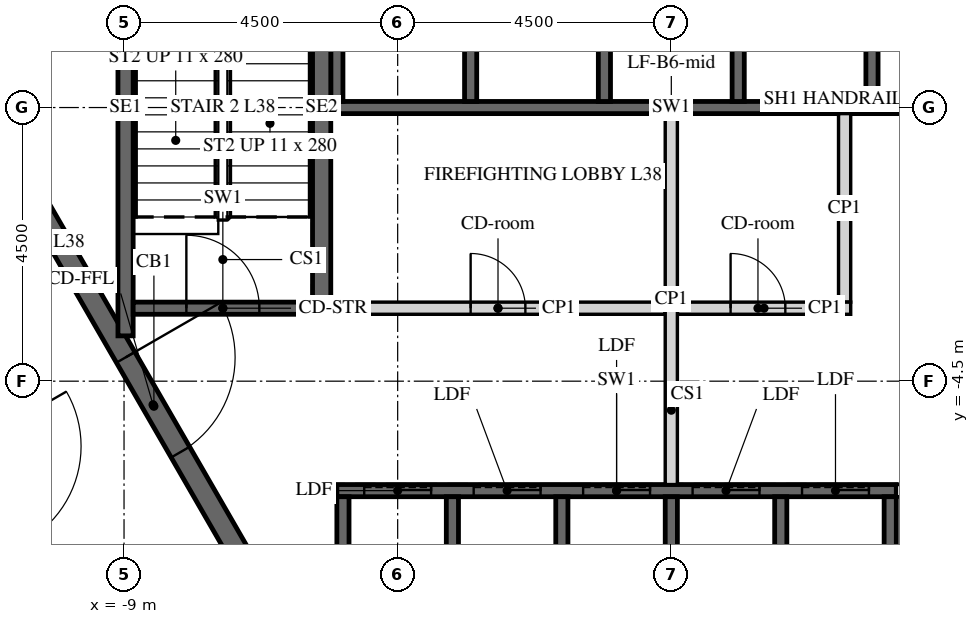
"""IFC4 building model, lengths in metres.
Left out: names, types, materials, properties, quantities, classifications, styles, units other than length and angle.
Written with IfcOpenShell. Run it as: python <this file> out.ifc"""

import sys

from ifc_helpers import new_model, si_unit, direction, frame, frame_2d, origin, place, context, subcontext, project, spatial, polyline, rectangle, outline, extrude, element, fill, save


model = new_model("IFC4")
c1 = context("Model", 3, precision=1e-05, world=origin(), true_north=direction((0.0, 1.0)))
c2 = subcontext(c1, "Body", "Model", "MODEL_VIEW")
j1 = project(units=[si_unit("LENGTHUNIT", "METRE"), si_unit("PLANEANGLEUNIT", "RADIAN")], contexts=[c1])
p1 = place(None, origin())
s1 = spatial("IfcSite", under=j1, at=p1, CompositionType="ELEMENT")
p2 = place(p1, origin())
s2 = spatial("IfcBuilding", under=s1, at=p2, CompositionType="ELEMENT")
p3 = place(p2, frame((0.0, 0.0, 164.4)))
s3 = spatial("IfcBuildingStorey", under=s2, at=p3, CompositionType="ELEMENT", Elevation=164.4)
p4 = place(p3, frame((-7.361, 12.75, -0.15), z_axis=(0.0, 0.0, 1.0), x_axis=(-0.50000571537, -0.866022103989, 0.0)))
e1 = element("IfcWall", 1, at=p4, inside=s3, PredefinedType="SHEAR", context=c2, shape_type="SweptSolid", body=[
    extrude(outline(polyline([(-0.144, -0.25), (14.867, -0.25), (14.578, 0.25), (0.144, 0.25), (-0.144, -0.25)])), origin(), (0.0, 0.0, 1.0), 3.9),
])
p5 = place(p4, frame((6.49, 0.0, 0.15)))
e2 = element("IfcOpeningElement", 2, at=p5, cuts=e1, PredefinedType="OPENING", context=c2, shape_type="SweptSolid", body=[
    extrude(rectangle(XDim=1.8, YDim=2.4, at=frame_2d((0.9, 1.2))), frame((0.0, 0.26, 0.0), z_axis=(0.0, -1.0, 0.0), x_axis=(1.0, 0.0, 0.0)), (0.0, 0.0, 1.0), 0.52),
])
p6 = place(p3, frame((-14.722, 0.0, -0.15), z_axis=(0.0, 0.0, 1.0), x_axis=(0.50000571537, -0.866022103989, 0.0)))
e3 = element("IfcWall", 3, at=p6, inside=s3, PredefinedType="SHEAR", context=c2, shape_type="SweptSolid", body=[
    extrude(outline(polyline([(-0.144, -0.25), (14.867, -0.25), (14.578, 0.25), (0.144, 0.25), (-0.144, -0.25)])), origin(), (0.0, 0.0, 1.0), 3.9),
])
p7 = place(p6, frame((6.432, 0.0, 0.15)))
e4 = element("IfcOpeningElement", 4, at=p7, cuts=e3, PredefinedType="OPENING", context=c2, shape_type="SweptSolid", body=[
    extrude(rectangle(XDim=1.8, YDim=2.4, at=frame_2d((0.9, 1.2))), frame((0.0, 0.26, 0.0), z_axis=(0.0, -1.0, 0.0), x_axis=(1.0, 0.0, 0.0)), (0.0, 0.0, 1.0), 0.52),
])
p8 = place(p3, frame((-5.673, 9.825, -0.15), z_axis=(0.0, 0.0, 1.0), x_axis=(-0.499995046907, -0.866028263435, 0.0)))
e5 = element("IfcWall", 5, at=p8, inside=s3, PredefinedType="SHEAR", context=c2, shape_type="SweptSolid", body=[
    extrude(outline(polyline([(-0.101, -0.175), (11.446, -0.175), (11.244, 0.175), (0.101, 0.175), (-0.101, -0.175)])), origin(), (0.0, 0.0, 1.0), 3.9),
])
p9 = place(p8, frame((4.801, 0.0, 0.15)))
e6 = element("IfcOpeningElement", 6, at=p9, cuts=e5, PredefinedType="OPENING", context=c2, shape_type="SweptSolid", body=[
    extrude(rectangle(XDim=1.8, YDim=2.4, at=frame_2d((0.9, 1.2))), frame((0.0, 0.185, 0.0), z_axis=(0.0, -1.0, 0.0), x_axis=(1.0, 0.0, 0.0)), (0.0, 0.0, 1.0), 0.37),
])
p10 = place(p3, frame((-11.345, 0.0, -0.15), z_axis=(0.0, 0.0, 1.0), x_axis=(0.499995046907, -0.866028263435, 0.0)))
e7 = element("IfcWall", 7, at=p10, inside=s3, PredefinedType="SHEAR", context=c2, shape_type="SweptSolid", body=[
    extrude(outline(polyline([(-0.101, -0.175), (11.446, -0.175), (11.244, 0.175), (0.101, 0.175), (-0.101, -0.175)])), origin(), (0.0, 0.0, 1.0), 3.9),
])
p11 = place(p10, frame((4.744, 0.0, 0.15)))
e8 = element("IfcOpeningElement", 8, at=p11, cuts=e7, PredefinedType="OPENING", context=c2, shape_type="SweptSolid", body=[
    extrude(rectangle(XDim=1.8, YDim=2.4, at=frame_2d((0.9, 1.2))), frame((0.0, 0.185, 0.0), z_axis=(0.0, -1.0, 0.0), x_axis=(1.0, 0.0, 0.0)), (0.0, 0.0, 1.0), 0.37),
])
p12 = place(p3, frame((-5.6, 0.0, -0.25), z_axis=(0.0, 0.0, 1.0), x_axis=(1.0, 0.0, 0.0)))
e9 = element("IfcWall", 9, at=p12, inside=s3, PredefinedType="SHEAR", context=c2, shape_type="SweptSolid", body=[
    extrude(rectangle(XDim=11.2, YDim=0.2, at=frame_2d((5.6, 0.0))), origin(), (0.0, 0.0, 1.0), 3.9),
])
for number, where, z_axis, x_axis in (
    (10, (-5.5, 0.1, -0.25), (0.0, 0.0, 1.0), (0.0, 1.0, 0.0)),
    (11, (-3.3, 0.1, -0.25), (0.0, 0.0, 1.0), (0.0, 1.0, 0.0)),
    (12, (-1.1, 0.1, -0.25), (0.0, 0.0, 1.0), (0.0, 1.0, 0.0)),
    (13, (1.1, 0.1, -0.25), (0.0, 0.0, 1.0), (0.0, 1.0, 0.0)),
    (14, (3.3, 0.1, -0.25), (0.0, 0.0, 1.0), (0.0, 1.0, 0.0)),
):
    element("IfcWall", number, at=place(p3, frame(where, z_axis=z_axis, x_axis=x_axis)), inside=s3, PredefinedType="SHEAR", context=c2, shape_type="SweptSolid", body=[
        extrude(rectangle(XDim=3.1, YDim=0.2, at=frame_2d((1.55, 0.0))), origin(), (0.0, 0.0, 1.0), 3.9),
    ])
p13 = place(p3, frame((-5.5, -6.3, -0.25), z_axis=(0.0, 0.0, 1.0), x_axis=(1.0, 0.0, 0.0)))
e15 = element("IfcWall", 15, at=p13, inside=s3, PredefinedType="SHEAR", context=c2, shape_type="SweptSolid", body=[
    extrude(rectangle(XDim=9.2, YDim=0.2, at=frame_2d((4.6, 0.0))), origin(), (0.0, 0.0, 1.0), 3.9),
])
p14 = place(p13, frame((0.45, 0.0, 0.25)))
e16 = element("IfcOpeningElement", 16, at=p14, cuts=e15, PredefinedType="OPENING", context=c2, shape_type="SweptSolid", body=[
    extrude(rectangle(XDim=1.1, YDim=2.1, at=frame_2d((0.55, 1.05))), frame((0.0, 0.11, 0.0), z_axis=(0.0, -1.0, 0.0), x_axis=(1.0, 0.0, 0.0)), (0.0, 0.0, 1.0), 0.22),
])
p15 = place(p13, frame((2.25, 0.0, 0.25)))
e17 = element("IfcOpeningElement", 17, at=p15, cuts=e15, PredefinedType="OPENING", context=c2, shape_type="SweptSolid", body=[
    extrude(rectangle(XDim=1.1, YDim=2.1, at=frame_2d((0.55, 1.05))), frame((0.0, 0.11, 0.0), z_axis=(0.0, -1.0, 0.0), x_axis=(1.0, 0.0, 0.0)), (0.0, 0.0, 1.0), 0.22),
])
p16 = place(p13, frame((4.05, 0.0, 0.25)))
e18 = element("IfcOpeningElement", 18, at=p16, cuts=e15, PredefinedType="OPENING", context=c2, shape_type="SweptSolid", body=[
    extrude(rectangle(XDim=1.1, YDim=2.1, at=frame_2d((0.55, 1.05))), frame((0.0, 0.11, 0.0), z_axis=(0.0, -1.0, 0.0), x_axis=(1.0, 0.0, 0.0)), (0.0, 0.0, 1.0), 0.22),
])
p17 = place(p13, frame((5.85, 0.0, 0.25)))
e19 = element("IfcOpeningElement", 19, at=p17, cuts=e15, PredefinedType="OPENING", context=c2, shape_type="SweptSolid", body=[
    extrude(rectangle(XDim=1.1, YDim=2.1, at=frame_2d((0.55, 1.05))), frame((0.0, 0.11, 0.0), z_axis=(0.0, -1.0, 0.0), x_axis=(1.0, 0.0, 0.0)), (0.0, 0.0, 1.0), 0.22),
])
p18 = place(p13, frame((7.65, 0.0, 0.25)))
e20 = element("IfcOpeningElement", 20, at=p18, cuts=e15, PredefinedType="OPENING", context=c2, shape_type="SweptSolid", body=[
    extrude(rectangle(XDim=1.1, YDim=2.1, at=frame_2d((0.55, 1.05))), frame((0.0, 0.11, 0.0), z_axis=(0.0, -1.0, 0.0), x_axis=(1.0, 0.0, 0.0)), (0.0, 0.0, 1.0), 0.22),
])
for number, where, z_axis, x_axis in (
    (21, (-5.4, -9.3, -0.25), (0.0, 0.0, 1.0), (0.0, 1.0, 0.0)),
    (22, (-3.6, -9.3, -0.25), (0.0, 0.0, 1.0), (0.0, 1.0, 0.0)),
    (23, (-1.8, -9.3, -0.25), (0.0, 0.0, 1.0), (0.0, 1.0, 0.0)),
    (24, (0.0, -9.3, -0.25), (0.0, 0.0, 1.0), (0.0, 1.0, 0.0)),
    (25, (1.8, -9.3, -0.25), (0.0, 0.0, 1.0), (0.0, 1.0, 0.0)),
    (26, (3.6, -9.3, -0.25), (0.0, 0.0, 1.0), (0.0, 1.0, 0.0)),
):
    element("IfcWall", number, at=place(p3, frame(where, z_axis=z_axis, x_axis=x_axis)), inside=s3, PredefinedType="SHEAR", context=c2, shape_type="SweptSolid", body=[
        extrude(rectangle(XDim=2.9, YDim=0.2, at=frame_2d((1.45, 0.0))), origin(), (0.0, 0.0, 1.0), 3.9),
    ])
p19 = place(p3, frame((-5.6, -3.3, 0.0), z_axis=(0.0, 0.0, 1.0), x_axis=(1.0, 0.0, 0.0)))
e27 = element("IfcWall", 27, at=p19, inside=s3, PredefinedType="PARTITIONING", context=c2, shape_type="SweptSolid", body=[
    extrude(rectangle(XDim=5.5, YDim=0.2, at=frame_2d((2.75, 0.0))), origin(), (0.0, 0.0, 1.0), 3.65),
])
p20 = place(p19, frame((2.3, 0.0, 0.0)))
e28 = element("IfcOpeningElement", 28, at=p20, cuts=e27, PredefinedType="OPENING", context=c2, shape_type="SweptSolid", body=[
    extrude(rectangle(XDim=0.9, YDim=2.1, at=frame_2d((0.45, 1.05))), frame((0.0, 0.11, 0.0), z_axis=(0.0, -1.0, 0.0), x_axis=(1.0, 0.0, 0.0)), (0.0, 0.0, 1.0), 0.22),
])
p21 = place(p3, frame((0.1, -3.3, 0.0), z_axis=(0.0, 0.0, 1.0), x_axis=(1.0, 0.0, 0.0)))
e29 = element("IfcWall", 29, at=p21, inside=s3, PredefinedType="PARTITIONING", context=c2, shape_type="SweptSolid", body=[
    extrude(rectangle(XDim=2.85, YDim=0.2, at=frame_2d((1.425, 0.0))), origin(), (0.0, 0.0, 1.0), 3.65),
])
p22 = place(p21, frame((0.875, 0.0, 0.0)))
e30 = element("IfcOpeningElement", 30, at=p22, cuts=e29, PredefinedType="OPENING", context=c2, shape_type="SweptSolid", body=[
    extrude(rectangle(XDim=0.9, YDim=2.1, at=frame_2d((0.45, 1.05))), frame((0.0, 0.11, 0.0), z_axis=(0.0, -1.0, 0.0), x_axis=(1.0, 0.0, 0.0)), (0.0, 0.0, 1.0), 0.22),
])
p23 = place(p3, frame((2.85, -3.2, 0.0), z_axis=(0.0, 0.0, 1.0), x_axis=(0.0, 1.0, 0.0)))
e31 = element("IfcWall", 31, at=p23, inside=s3, PredefinedType="PARTITIONING", context=c2, shape_type="SweptSolid", body=[
    extrude(rectangle(XDim=3.1, YDim=0.2, at=frame_2d((1.55, 0.0))), origin(), (0.0, 0.0, 1.0), 3.65),
])
p24 = place(p3, frame((0.0, -6.2, 0.0), z_axis=(0.0, 0.0, 1.0), x_axis=(0.0, 1.0, 0.0)))
e32 = element("IfcWall", 32, at=p24, inside=s3, PredefinedType="PARTITIONING", context=c2, shape_type="SweptSolid", body=[
    extrude(rectangle(XDim=6.1, YDim=0.2, at=frame_2d((3.05, 0.0))), origin(), (0.0, 0.0, 1.0), 3.65),
])
p25 = place(p3, frame((3.7, -6.3, 0.0), z_axis=(0.0, 0.0, 1.0), x_axis=(1.0, 0.0, 0.0)))
e33 = element("IfcWall", 33, at=p25, inside=s3, PredefinedType="PARTITIONING", context=c2, shape_type="SweptSolid", body=[
    extrude(rectangle(XDim=3.806, YDim=0.2, at=frame_2d((1.903, 0.0))), origin(), (0.0, 0.0, 1.0), 3.65),
])
p26 = place(p25, frame((1.453, 0.0, 0.0)))
e34 = element("IfcOpeningElement", 34, at=p26, cuts=e33, PredefinedType="OPENING", context=c2, shape_type="SweptSolid", body=[
    extrude(rectangle(XDim=0.9, YDim=2.1, at=frame_2d((0.45, 1.05))), frame((0.0, 0.11, 0.0), z_axis=(0.0, -1.0, 0.0), x_axis=(1.0, 0.0, 0.0)), (0.0, 0.0, 1.0), 0.22),
])
p27 = place(p3, frame((-5.75, -3.4, -0.25), z_axis=(0.0, 0.0, 1.0), x_axis=(0.0, 1.0, 0.0)))
e35 = element("IfcWall", 35, at=p27, inside=s3, PredefinedType="SHEAR", context=c2, shape_type="SweptSolid", body=[
    extrude(rectangle(XDim=6.8, YDim=0.3, at=frame_2d((3.4, 0.0))), origin(), (0.0, 0.0, 1.0), 3.9),
])
p28 = place(p3, frame((-8.975, -3.755, -0.25), z_axis=(0.0, 0.0, 1.0), x_axis=(0.0, 1.0, 0.0)))
e36 = element("IfcWall", 36, at=p28, inside=s3, PredefinedType="SHEAR", context=c2, shape_type="SweptSolid", body=[
    extrude(rectangle(XDim=7.51, YDim=0.25, at=frame_2d((3.755, 0.0))), origin(), (0.0, 0.0, 1.0), 3.9),
])
p29 = place(p3, frame((-8.85, -3.3, -0.25), z_axis=(0.0, 0.0, 1.0), x_axis=(1.0, 0.0, 0.0)))
e37 = element("IfcWall", 37, at=p29, inside=s3, PredefinedType="SHEAR", context=c2, shape_type="SweptSolid", body=[
    extrude(rectangle(XDim=2.95, YDim=0.2, at=frame_2d((1.475, 0.0))), origin(), (0.0, 0.0, 1.0), 3.9),
])
p30 = place(p29, frame((0.875, 0.0, 0.25)))
e38 = element("IfcOpeningElement", 38, at=p30, cuts=e37, PredefinedType="OPENING", context=c2, shape_type="SweptSolid", body=[
    extrude(rectangle(XDim=1.2, YDim=2.4, at=frame_2d((0.6, 1.2))), frame((0.0, 0.11, 0.0), z_axis=(0.0, -1.0, 0.0), x_axis=(1.0, 0.0, 0.0)), (0.0, 0.0, 1.0), 0.22),
])
p31 = place(p3, frame((-16.094, -2.125, 0.0), z_axis=(0.0, 0.0, 1.0), x_axis=(0.500010545262, -0.866019315389, 0.0)))
e39 = element("IfcWall", 39, at=p31, inside=s3, PredefinedType="PARTITIONING", context=c2, shape_type="SweptSolid", body=[
    extrude(rectangle(XDim=14.867, YDim=0.15, at=frame_2d((7.434, 0.0))), origin(), (0.0, 0.0, 1.0), 2.988),
])
p32 = place(p31, frame((3.619, 0.0, 0.0)))
e40 = element("IfcOpeningElement", 40, at=p32, cuts=e39, PredefinedType="OPENING", context=c2, shape_type="SweptSolid", body=[
    extrude(rectangle(XDim=1.0, YDim=2.1, at=frame_2d((0.5, 1.05))), frame((0.0, 0.085, 0.0), z_axis=(0.0, -1.0, 0.0), x_axis=(1.0, 0.0, 0.0)), (0.0, 0.0, 1.0), 0.17),
])
p33 = place(p31, frame((9.924, 0.0, 0.0)))
e41 = element("IfcOpeningElement", 41, at=p33, cuts=e39, PredefinedType="OPENING", context=c2, shape_type="SweptSolid", body=[
    extrude(rectangle(XDim=1.0, YDim=2.1, at=frame_2d((0.5, 1.05))), frame((0.0, 0.085, 0.0), z_axis=(0.0, -1.0, 0.0), x_axis=(1.0, 0.0, 0.0)), (0.0, 0.0, 1.0), 0.17),
])
p34 = place(p31, frame((13.717, 0.0, 0.0)))
e42 = element("IfcOpeningElement", 42, at=p34, cuts=e39, PredefinedType="OPENING", context=c2, shape_type="SweptSolid", body=[
    extrude(rectangle(XDim=1.0, YDim=2.1, at=frame_2d((0.5, 1.05))), frame((0.0, 0.085, 0.0), z_axis=(0.0, -1.0, 0.0), x_axis=(1.0, 0.0, 0.0)), (0.0, 0.0, 1.0), 0.17),
])
p35 = place(p11, origin())
e43 = element("IfcDoor", 43, at=p35, inside=s3, OperationType="DOUBLE_DOOR_SINGLE_SWING", PredefinedType="DOOR", context=c2, shape_type="SweptSolid", body=[
    extrude(rectangle(XDim=1.8, YDim=2.4, at=frame_2d((0.9, 1.2))), frame((0.0, 0.025, 0.0), z_axis=(0.0, -1.0, 0.0), x_axis=(1.0, 0.0, 0.0)), (0.0, 0.0, 1.0), 0.05),
])
fill(e8, e43)
p36 = place(p20, origin())
e44 = element("IfcDoor", 44, at=p36, inside=s3, OperationType="SINGLE_SWING_LEFT", PredefinedType="DOOR", context=c2, shape_type="SweptSolid", body=[
    extrude(rectangle(XDim=0.9, YDim=2.1, at=frame_2d((0.45, 1.05))), frame((0.0, 0.025, 0.0), z_axis=(0.0, -1.0, 0.0), x_axis=(1.0, 0.0, 0.0)), (0.0, 0.0, 1.0), 0.05),
])
fill(e28, e44)
p37 = place(p22, origin())
e45 = element("IfcDoor", 45, at=p37, inside=s3, OperationType="SINGLE_SWING_LEFT", PredefinedType="DOOR", context=c2, shape_type="SweptSolid", body=[
    extrude(rectangle(XDim=0.9, YDim=2.1, at=frame_2d((0.45, 1.05))), frame((0.0, 0.025, 0.0), z_axis=(0.0, -1.0, 0.0), x_axis=(1.0, 0.0, 0.0)), (0.0, 0.0, 1.0), 0.05),
])
fill(e30, e45)
p38 = place(p30, origin())
e46 = element("IfcDoor", 46, at=p38, inside=s3, OperationType="SINGLE_SWING_LEFT", PredefinedType="DOOR", context=c2, shape_type="SweptSolid", body=[
    extrude(rectangle(XDim=1.2, YDim=2.4, at=frame_2d((0.6, 1.2))), frame((0.0, 0.025, 0.0), z_axis=(0.0, -1.0, 0.0), x_axis=(1.0, 0.0, 0.0)), (0.0, 0.0, 1.0), 0.05),
])
fill(e38, e46)
p39 = place(p14, origin())
e47 = element("IfcDoor", 47, at=p39, inside=s3, OperationType="SLIDING_TO_LEFT", PredefinedType="DOOR", context=c2, shape_type="SweptSolid", body=[
    extrude(rectangle(XDim=1.1, YDim=2.1, at=frame_2d((0.55, 1.05))), frame((0.0, 0.025, 0.0), z_axis=(0.0, -1.0, 0.0), x_axis=(1.0, 0.0, 0.0)), (0.0, 0.0, 1.0), 0.05),
])
fill(e16, e47)
p40 = place(p15, origin())
e48 = element("IfcDoor", 48, at=p40, inside=s3, OperationType="SLIDING_TO_LEFT", PredefinedType="DOOR", context=c2, shape_type="SweptSolid", body=[
    extrude(rectangle(XDim=1.1, YDim=2.1, at=frame_2d((0.55, 1.05))), frame((0.0, 0.025, 0.0), z_axis=(0.0, -1.0, 0.0), x_axis=(1.0, 0.0, 0.0)), (0.0, 0.0, 1.0), 0.05),
])
fill(e17, e48)
p41 = place(p16, origin())
e49 = element("IfcDoor", 49, at=p41, inside=s3, OperationType="SLIDING_TO_LEFT", PredefinedType="DOOR", context=c2, shape_type="SweptSolid", body=[
    extrude(rectangle(XDim=1.1, YDim=2.1, at=frame_2d((0.55, 1.05))), frame((0.0, 0.025, 0.0), z_axis=(0.0, -1.0, 0.0), x_axis=(1.0, 0.0, 0.0)), (0.0, 0.0, 1.0), 0.05),
])
fill(e18, e49)
p42 = place(p17, origin())
e50 = element("IfcDoor", 50, at=p42, inside=s3, OperationType="SLIDING_TO_LEFT", PredefinedType="DOOR", context=c2, shape_type="SweptSolid", body=[
    extrude(rectangle(XDim=1.1, YDim=2.1, at=frame_2d((0.55, 1.05))), frame((0.0, 0.025, 0.0), z_axis=(0.0, -1.0, 0.0), x_axis=(1.0, 0.0, 0.0)), (0.0, 0.0, 1.0), 0.05),
])
fill(e19, e50)
p43 = place(p18, origin())
e51 = element("IfcDoor", 51, at=p43, inside=s3, OperationType="SLIDING_TO_LEFT", PredefinedType="DOOR", context=c2, shape_type="SweptSolid", body=[
    extrude(rectangle(XDim=1.1, YDim=2.1, at=frame_2d((0.55, 1.05))), frame((0.0, 0.025, 0.0), z_axis=(0.0, -1.0, 0.0), x_axis=(1.0, 0.0, 0.0)), (0.0, 0.0, 1.0), 0.05),
])
fill(e20, e51)
save(model, sys.argv[1])
